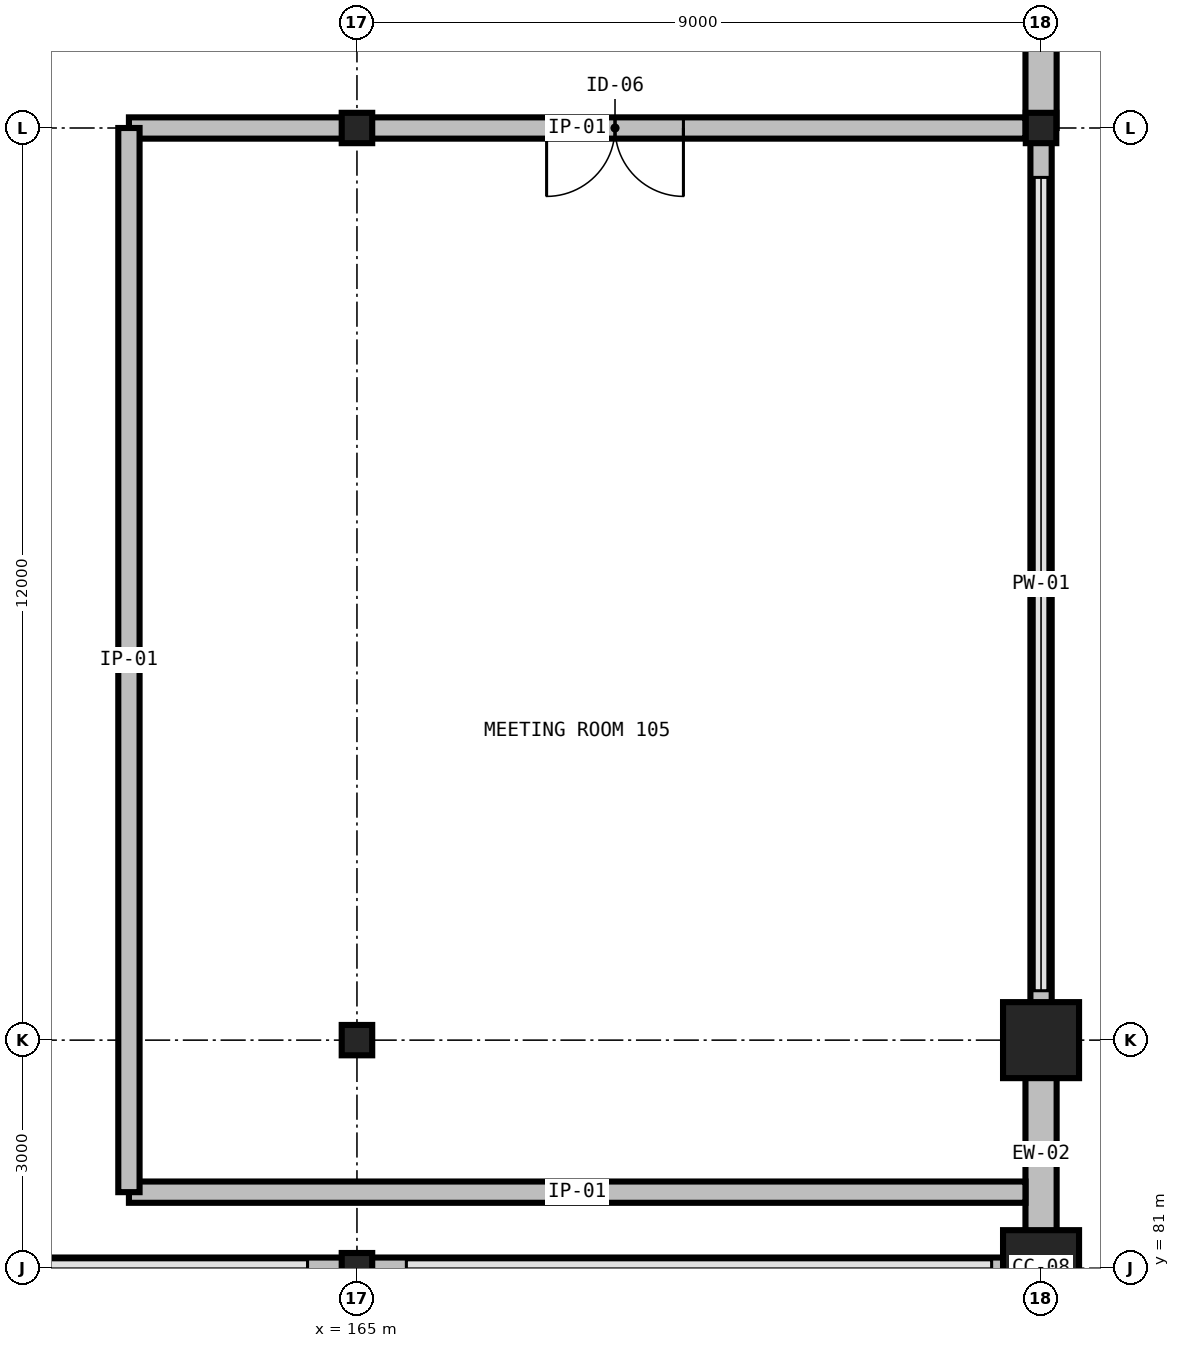
"""IFC4 building model, lengths in metres.
Left out: names, types, materials, properties, quantities, classifications, styles, units other than length and angle.
Written with IfcOpenShell. Run it as: python <this file> out.ifc"""

import sys

from ifc_helpers import new_model, si_unit, direction, frame, frame_2d, origin, origin_2d, place, context, subcontext, project, spatial, rectangle, circle, i_section, extrude, element, fill, save


model = new_model("IFC4")
c1 = context("Model", 3, precision=1e-05, world=origin(), true_north=direction((0.0, 1.0)))
c2 = subcontext(c1, "Body", "Model", "MODEL_VIEW")
j1 = project(units=[si_unit("LENGTHUNIT", "METRE"), si_unit("PLANEANGLEUNIT", "RADIAN")], contexts=[c1])
p1 = place(None, origin())
s1 = spatial("IfcSite", under=j1, at=p1, CompositionType="ELEMENT")
p2 = place(p1, origin())
s2 = spatial("IfcBuilding", under=s1, at=p2, CompositionType="ELEMENT")
p3 = place(p2, frame((0.0, 0.0, 6.0)))
s3 = spatial("IfcBuildingStorey", under=s2, at=p3, CompositionType="ELEMENT", Elevation=6.0)
for number, where, z_axis, x_axis in (
    (1, (165.0, 81.0, 0.0), (0.0, 0.0, 1.0), (1.0, 0.0, 0.0)),
    (2, (165.0, 84.0, 0.0), (0.0, 0.0, 1.0), (1.0, 0.0, 0.0)),
    (3, (165.0, 96.0, 0.0), (0.0, 0.0, 1.0), (1.0, 0.0, 0.0)),
):
    element("IfcColumn", number, at=place(p3, frame(where, z_axis=z_axis, x_axis=x_axis)), inside=s3, PredefinedType="COLUMN", context=c2, shape_type="SweptSolid", body=[
        extrude(i_section(OverallWidth=0.401, OverallDepth=0.399, WebThickness=0.025, FlangeThickness=0.04, FilletRadius=0.031, at=origin_2d()), origin(), (0.0, 0.0, 1.0), 6.0),
    ])
for number, where, z_axis, x_axis in (
    (4, (174.0, 81.0, 0.0), (0.0, 0.0, 1.0), (1.0, 0.0, 0.0)),
    (5, (174.0, 84.0, 0.0), (0.0, 0.0, 1.0), (1.0, 0.0, 0.0)),
):
    element("IfcColumn", number, at=place(p3, frame(where, z_axis=z_axis, x_axis=x_axis)), inside=s3, PredefinedType="COLUMN", context=c2, shape_type="SweptSolid", body=[
        extrude(circle(Radius=0.5, at=origin_2d()), origin(), (0.0, 0.0, 1.0), 6.0),
    ])
p4 = place(p3, frame((174.0, 96.0, 0.0), z_axis=(0.0, 0.0, 1.0), x_axis=(1.0, 0.0, 0.0)))
e6 = element("IfcColumn", 6, at=p4, inside=s3, PredefinedType="COLUMN", context=c2, shape_type="SweptSolid", body=[
    extrude(i_section(OverallWidth=0.401, OverallDepth=0.399, WebThickness=0.025, FlangeThickness=0.04, FilletRadius=0.031, at=origin_2d()), origin(), (0.0, 0.0, 1.0), 6.0),
])
p5 = place(p3, frame((174.0, 81.0, 0.0), z_axis=(0.0, 0.0, 1.0), x_axis=(0.0, 1.0, 0.0)))
e7 = element("IfcWall", 7, at=p5, inside=s3, PredefinedType="STANDARD", context=c2, shape_type="SweptSolid", body=[
    extrude(rectangle(XDim=3.0, YDim=0.41, at=frame_2d((1.5, 0.0))), origin(), (0.0, 0.0, 1.0), 5.269),
])
p6 = place(p3, frame((174.0, 84.0, 0.0), z_axis=(0.0, 0.0, 1.0), x_axis=(0.0, 1.0, 0.0)))
e8 = element("IfcWall", 8, at=p6, inside=s3, PredefinedType="PARAPET", context=c2, shape_type="SweptSolid", body=[
    extrude(rectangle(XDim=12.0, YDim=0.28, at=frame_2d((6.0, 0.0))), origin(), (0.0, 0.0, 1.0), 0.2),
])
p7 = place(p3, frame((174.0, 96.0, 0.0), z_axis=(0.0, 0.0, 1.0), x_axis=(0.0, 1.0, 0.0)))
e9 = element("IfcWall", 9, at=p7, inside=s3, PredefinedType="STANDARD", context=c2, shape_type="SweptSolid", body=[
    extrude(rectangle(XDim=9.0, YDim=0.41, at=frame_2d((4.5, 0.0))), origin(), (0.0, 0.0, 1.0), 5.269),
])
for number, where, z_axis, x_axis in (
    (10, (156.0, 81.0, 0.0), (0.0, 0.0, 1.0), (1.0, 0.0, 0.0)),
    (11, (165.0, 81.0, 0.0), (0.0, 0.0, 1.0), (1.0, 0.0, 0.0)),
):
    element("IfcWall", number, at=place(p3, frame(where, z_axis=z_axis, x_axis=x_axis)), inside=s3, PredefinedType="PARAPET", context=c2, shape_type="SweptSolid", body=[
        extrude(rectangle(XDim=9.0, YDim=0.28, at=frame_2d((4.5, 0.0))), origin(), (0.0, 0.0, 1.0), 0.2),
    ])
p8 = place(p3, frame((162.0, 82.0, 0.0), z_axis=(0.0, 0.0, 1.0), x_axis=(1.0, 0.0, 0.0)))
e12 = element("IfcWall", 12, at=p8, inside=s3, PredefinedType="PARTITIONING", context=c2, shape_type="SweptSolid", body=[
    extrude(rectangle(XDim=11.795, YDim=0.28, at=frame_2d((5.897, 0.0))), origin(), (0.0, 0.0, 1.0), 5.68),
])
p9 = place(p3, frame((173.795, 96.0, 0.0), z_axis=(0.0, 0.0, 1.0), x_axis=(-1.0, 0.0, 0.0)))
e13 = element("IfcWall", 13, at=p9, inside=s3, PredefinedType="PARTITIONING", context=c2, shape_type="SweptSolid", body=[
    extrude(rectangle(XDim=11.795, YDim=0.28, at=frame_2d((5.897, 0.0))), origin(), (0.0, 0.0, 1.0), 4.987),
])
p10 = place(p9, frame((4.5, 0.0, 0.0)))
e14 = element("IfcOpeningElement", 14, at=p10, cuts=e13, PredefinedType="OPENING", context=c2, shape_type="SweptSolid", body=[
    extrude(rectangle(XDim=1.8, YDim=2.3, at=frame_2d((0.9, 1.15))), frame((0.0, 0.155, 0.0), z_axis=(0.0, -1.0, 0.0), x_axis=(1.0, 0.0, 0.0)), (0.0, 0.0, 1.0), 0.31),
])
p11 = place(p3, frame((162.0, 96.0, 0.0), z_axis=(0.0, 0.0, 1.0), x_axis=(0.0, -1.0, 0.0)))
e15 = element("IfcWall", 15, at=p11, inside=s3, PredefinedType="PARTITIONING", context=c2, shape_type="SweptSolid", body=[
    extrude(rectangle(XDim=14.0, YDim=0.28, at=frame_2d((7.0, 0.0))), origin(), (0.0, 0.0, 1.0), 5.68),
])
p12 = place(p10, origin())
e16 = element("IfcDoor", 16, at=p12, inside=s3, OperationType="DOUBLE_DOOR_SINGLE_SWING", PredefinedType="DOOR", context=c2, shape_type="SweptSolid", body=[
    extrude(rectangle(XDim=1.8, YDim=2.3, at=frame_2d((0.9, 1.15))), frame((0.0, 0.025, 0.0), z_axis=(0.0, -1.0, 0.0), x_axis=(1.0, 0.0, 0.0)), (0.0, 0.0, 1.0), 0.05),
])
fill(e14, e16)
save(model, sys.argv[1])
